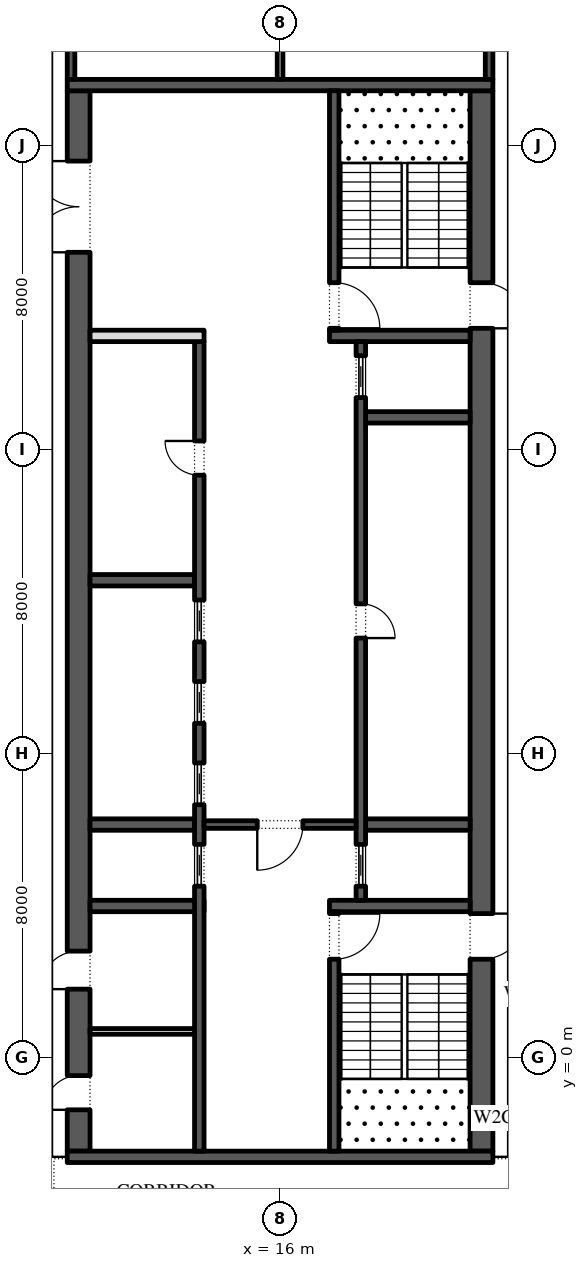
"""IFC4 building model, lengths in metres.
Left out: names, types, materials, properties, quantities, classifications, styles, units other than length and angle.
Written with IfcOpenShell. Run it as: python <this file> out.ifc"""

import sys

from ifc_helpers import new_model, si_unit, direction, frame, frame_2d, origin, place, context, subcontext, project, spatial, rectangle, extrude, element, fill, save


model = new_model("IFC4")
c1 = context("Model", 3, precision=1e-05, world=origin(), true_north=direction((0.0, 1.0)))
c2 = subcontext(c1, "Body", "Model", "MODEL_VIEW")
j1 = project(units=[si_unit("LENGTHUNIT", "METRE"), si_unit("PLANEANGLEUNIT", "RADIAN")], contexts=[c1])
p1 = place(None, origin())
s1 = spatial("IfcSite", under=j1, at=p1, CompositionType="ELEMENT")
p2 = place(p1, origin())
s2 = spatial("IfcBuilding", under=s1, at=p2, CompositionType="ELEMENT")
p3 = place(p2, frame((0.0, 0.0, 293.4)))
s3 = spatial("IfcBuildingStorey", under=s2, at=p3, CompositionType="ELEMENT", Elevation=293.4)
p4 = place(p3, frame((21.359, -11.678, 0.0), z_axis=(0.0, 0.0, 1.0), x_axis=(0.224949198343, 0.974370493275, 0.0)))
e1 = element("IfcWall", 1, at=p4, inside=s3, PredefinedType="STANDARD", context=c2, shape_type="SweptSolid", body=[
    extrude(rectangle(XDim=49.5, YDim=0.3, at=frame_2d((24.75, 0.0))), origin(), (0.0, 0.0, 1.0), 3.75),
])
p5 = place(p4, frame((0.907, 0.0, 0.45)))
e2 = element("IfcOpeningElement", 2, at=p5, cuts=e1, PredefinedType="OPENING", context=c2, shape_type="SweptSolid", body=[
    extrude(rectangle(XDim=5.0, YDim=3.25, at=frame_2d((2.5, 1.625))), frame((0.0, 0.16, 0.0), z_axis=(0.0, -1.0, 0.0), x_axis=(1.0, 0.0, 0.0)), (0.0, 0.0, 1.0), 0.32),
])
p6 = place(p4, frame((7.871, 0.0, 0.45)))
e3 = element("IfcOpeningElement", 3, at=p6, cuts=e1, PredefinedType="OPENING", context=c2, shape_type="SweptSolid", body=[
    extrude(rectangle(XDim=5.0, YDim=2.85, at=frame_2d((2.5, 1.425))), frame((0.0, 0.16, 0.0), z_axis=(0.0, -1.0, 0.0), x_axis=(1.0, 0.0, 0.0)), (0.0, 0.0, 1.0), 0.32),
])
p7 = place(p4, frame((14.986, 0.0, 0.45)))
e4 = element("IfcOpeningElement", 4, at=p7, cuts=e1, PredefinedType="OPENING", context=c2, shape_type="SweptSolid", body=[
    extrude(rectangle(XDim=5.0, YDim=2.85, at=frame_2d((2.5, 1.425))), frame((0.0, 0.16, 0.0), z_axis=(0.0, -1.0, 0.0), x_axis=(1.0, 0.0, 0.0)), (0.0, 0.0, 1.0), 0.32),
])
p8 = place(p4, frame((22.1, 0.0, 0.45)))
e5 = element("IfcOpeningElement", 5, at=p8, cuts=e1, PredefinedType="OPENING", context=c2, shape_type="SweptSolid", body=[
    extrude(rectangle(XDim=5.0, YDim=2.8, at=frame_2d((2.5, 1.4))), frame((0.0, 0.16, 0.0), z_axis=(0.0, -1.0, 0.0), x_axis=(1.0, 0.0, 0.0)), (0.0, 0.0, 1.0), 0.32),
])
p9 = place(p4, frame((29.214, 0.0, 0.45)))
e6 = element("IfcOpeningElement", 6, at=p9, cuts=e1, PredefinedType="OPENING", context=c2, shape_type="SweptSolid", body=[
    extrude(rectangle(XDim=5.0, YDim=2.7, at=frame_2d((2.5, 1.35))), frame((0.0, 0.16, 0.0), z_axis=(0.0, -1.0, 0.0), x_axis=(1.0, 0.0, 0.0)), (0.0, 0.0, 1.0), 0.32),
])
p10 = place(p4, frame((37.628, 0.0, 0.0)))
e7 = element("IfcOpeningElement", 7, at=p10, cuts=e1, PredefinedType="OPENING", context=c2, shape_type="SweptSolid", body=[
    extrude(rectangle(XDim=2.4, YDim=2.65, at=frame_2d((1.2, 1.325))), frame((0.0, 0.16, 0.0), z_axis=(0.0, -1.0, 0.0), x_axis=(1.0, 0.0, 0.0)), (0.0, 0.0, 1.0), 0.32),
])
p11 = place(p4, frame((43.443, 0.0, 0.45)))
e8 = element("IfcOpeningElement", 8, at=p11, cuts=e1, PredefinedType="OPENING", context=c2, shape_type="SweptSolid", body=[
    extrude(rectangle(XDim=5.0, YDim=3.25, at=frame_2d((2.5, 1.625))), frame((0.0, 0.16, 0.0), z_axis=(0.0, -1.0, 0.0), x_axis=(1.0, 0.0, 0.0)), (0.0, 0.0, 1.0), 0.32),
])
p12 = place(p3, frame((21.3, -2.45, 0.0), z_axis=(0.0, 0.0, 1.0), x_axis=(0.0, 1.0, 0.0)))
e9 = element("IfcWall", 9, at=p12, inside=s3, PredefinedType="SHEAR", context=c2, shape_type="SweptSolid", body=[
    extrude(rectangle(XDim=27.9, YDim=0.6, at=frame_2d((13.95, 0.0))), origin(), (0.0, 0.0, 1.0), 3.75),
])
p13 = place(p12, frame((5.05, 0.0, 0.0)))
e10 = element("IfcOpeningElement", 10, at=p13, cuts=e9, PredefinedType="OPENING", context=c2, shape_type="SweptSolid", body=[
    extrude(rectangle(XDim=1.2, YDim=2.1, at=frame_2d((0.6, 1.05))), frame((0.0, 0.31, 0.0), z_axis=(0.0, -1.0, 0.0), x_axis=(1.0, 0.0, 0.0)), (0.0, 0.0, 1.0), 0.62),
])
p14 = place(p12, frame((21.65, 0.0, 0.0)))
e11 = element("IfcOpeningElement", 11, at=p14, cuts=e9, PredefinedType="OPENING", context=c2, shape_type="SweptSolid", body=[
    extrude(rectangle(XDim=1.2, YDim=2.1, at=frame_2d((0.6, 1.05))), frame((0.0, 0.31, 0.0), z_axis=(0.0, -1.0, 0.0), x_axis=(1.0, 0.0, 0.0)), (0.0, 0.0, 1.0), 0.62),
])
p15 = place(p3, frame((10.7, -2.45, 0.0), z_axis=(0.0, 0.0, 1.0), x_axis=(0.0, 1.0, 0.0)))
e12 = element("IfcWall", 12, at=p15, inside=s3, PredefinedType="SHEAR", context=c2, shape_type="SweptSolid", body=[
    extrude(rectangle(XDim=27.9, YDim=0.6, at=frame_2d((13.95, 0.0))), origin(), (0.0, 0.0, 1.0), 3.75),
])
p16 = place(p15, frame((23.65, 0.0, 0.0)))
e13 = element("IfcOpeningElement", 13, at=p16, cuts=e12, PredefinedType="OPENING", context=c2, shape_type="SweptSolid", body=[
    extrude(rectangle(XDim=2.4, YDim=2.1, at=frame_2d((1.2, 1.05))), frame((0.0, 0.31, 0.0), z_axis=(0.0, -1.0, 0.0), x_axis=(1.0, 0.0, 0.0)), (0.0, 0.0, 1.0), 0.62),
])
p17 = place(p15, frame((1.087, 0.0, 0.0)))
e14 = element("IfcOpeningElement", 14, at=p17, cuts=e12, PredefinedType="OPENING", context=c2, shape_type="SweptSolid", body=[
    extrude(rectangle(XDim=0.9, YDim=2.1, at=frame_2d((0.45, 1.05))), frame((0.0, 0.31, 0.0), z_axis=(0.0, -1.0, 0.0), x_axis=(1.0, 0.0, 0.0)), (0.0, 0.0, 1.0), 0.62),
])
p18 = place(p15, frame((4.262, 0.0, 0.0)))
e15 = element("IfcOpeningElement", 15, at=p18, cuts=e12, PredefinedType="OPENING", context=c2, shape_type="SweptSolid", body=[
    extrude(rectangle(XDim=1.0, YDim=2.1, at=frame_2d((0.5, 1.05))), frame((0.0, 0.31, 0.0), z_axis=(0.0, -1.0, 0.0), x_axis=(1.0, 0.0, 0.0)), (0.0, 0.0, 1.0), 0.62),
])
for number, where, z_axis, x_axis in (
    (16, (10.4, -2.6, 0.0), (0.0, 0.0, 1.0), (1.0, 0.0, 0.0)),
    (17, (10.4, 25.6, 0.0), (0.0, 0.0, 1.0), (1.0, 0.0, 0.0)),
):
    element("IfcWall", number, at=place(p3, frame(where, z_axis=z_axis, x_axis=x_axis)), inside=s3, PredefinedType="SHEAR", context=c2, shape_type="SweptSolid", body=[
        extrude(rectangle(XDim=11.2, YDim=0.3, at=frame_2d((5.6, 0.0))), origin(), (0.0, 0.0, 1.0), 3.75),
    ])
p19 = place(p3, frame((17.3, 4.0, 0.0), z_axis=(0.0, 0.0, 1.0), x_axis=(1.0, 0.0, 0.0)))
e18 = element("IfcWall", 18, at=p19, inside=s3, PredefinedType="SHEAR", context=c2, shape_type="SweptSolid", body=[
    extrude(rectangle(XDim=3.7, YDim=0.3, at=frame_2d((1.85, 0.0))), origin(), (0.0, 0.0, 1.0), 3.75),
])
p20 = place(p3, frame((17.425, -2.45, 0.0), z_axis=(0.0, 0.0, 1.0), x_axis=(0.0, 1.0, 0.0)))
e19 = element("IfcWall", 19, at=p20, inside=s3, PredefinedType="SHEAR", context=c2, shape_type="SweptSolid", body=[
    extrude(rectangle(XDim=6.3, YDim=0.25, at=frame_2d((3.15, 0.0))), origin(), (0.0, 0.0, 1.0), 3.75),
])
p21 = place(p20, frame((5.05, 0.0, 0.0)))
e20 = element("IfcOpeningElement", 20, at=p21, cuts=e19, PredefinedType="OPENING", context=c2, shape_type="SweptSolid", body=[
    extrude(rectangle(XDim=1.2, YDim=2.1, at=frame_2d((0.6, 1.05))), frame((0.0, 0.135, 0.0), z_axis=(0.0, -1.0, 0.0), x_axis=(1.0, 0.0, 0.0)), (0.0, 0.0, 1.0), 0.27),
])
p22 = place(p3, frame((17.3, 19.0, 0.0), z_axis=(0.0, 0.0, 1.0), x_axis=(1.0, 0.0, 0.0)))
e21 = element("IfcWall", 21, at=p22, inside=s3, PredefinedType="SHEAR", context=c2, shape_type="SweptSolid", body=[
    extrude(rectangle(XDim=3.7, YDim=0.3, at=frame_2d((1.85, 0.0))), origin(), (0.0, 0.0, 1.0), 3.75),
])
p23 = place(p3, frame((17.425, 19.15, 0.0), z_axis=(0.0, 0.0, 1.0), x_axis=(0.0, 1.0, 0.0)))
e22 = element("IfcWall", 22, at=p23, inside=s3, PredefinedType="SHEAR", context=c2, shape_type="SweptSolid", body=[
    extrude(rectangle(XDim=6.3, YDim=0.25, at=frame_2d((3.15, 0.0))), origin(), (0.0, 0.0, 1.0), 3.75),
])
p24 = place(p23, frame((0.05, 0.0, 0.0)))
e23 = element("IfcOpeningElement", 23, at=p24, cuts=e22, PredefinedType="OPENING", context=c2, shape_type="SweptSolid", body=[
    extrude(rectangle(XDim=1.2, YDim=2.1, at=frame_2d((0.6, 1.05))), frame((0.0, 0.135, 0.0), z_axis=(0.0, -1.0, 0.0), x_axis=(1.0, 0.0, 0.0)), (0.0, 0.0, 1.0), 0.27),
])
for number, where, z_axis, x_axis in (
    (24, (18.25, 6.143, 0.0), (0.0, 0.0, 1.0), (1.0, 0.0, 0.0)),
    (25, (18.25, 16.857, 0.0), (0.0, 0.0, 1.0), (1.0, 0.0, 0.0)),
):
    element("IfcWall", number, at=place(p3, frame(where, z_axis=z_axis, x_axis=x_axis)), inside=s3, PredefinedType="SHEAR", context=c2, shape_type="SweptSolid", body=[
        extrude(rectangle(XDim=2.75, YDim=0.3, at=frame_2d((1.375, 0.0))), origin(), (0.0, 0.0, 1.0), 3.75),
    ])
p25 = place(p3, frame((18.125, 4.15, 0.0), z_axis=(0.0, 0.0, 1.0), x_axis=(0.0, 1.0, 0.0)))
e26 = element("IfcWall", 26, at=p25, inside=s3, PredefinedType="SHEAR", context=c2, shape_type="SweptSolid", body=[
    extrude(rectangle(XDim=14.7, YDim=0.25, at=frame_2d((7.35, 0.0))), origin(), (0.0, 0.0, 1.0), 3.75),
])
p26 = place(p25, frame((6.9, 0.0, 0.0)))
e27 = element("IfcOpeningElement", 27, at=p26, cuts=e26, PredefinedType="OPENING", context=c2, shape_type="SweptSolid", body=[
    extrude(rectangle(XDim=0.9, YDim=2.1, at=frame_2d((0.45, 1.05))), frame((0.0, 0.135, 0.0), z_axis=(0.0, -1.0, 0.0), x_axis=(1.0, 0.0, 0.0)), (0.0, 0.0, 1.0), 0.27),
])
p27 = place(p25, frame((0.371, 0.0, 0.0)))
e28 = element("IfcOpeningElement", 28, at=p27, cuts=e26, PredefinedType="OPENING", context=c2, shape_type="SweptSolid", body=[
    extrude(rectangle(XDim=1.1, YDim=2.1, at=frame_2d((0.55, 1.05))), frame((0.0, 0.135, 0.0), z_axis=(0.0, -1.0, 0.0), x_axis=(1.0, 0.0, 0.0)), (0.0, 0.0, 1.0), 0.27),
])
p28 = place(p25, frame((13.229, 0.0, 0.0)))
e29 = element("IfcOpeningElement", 29, at=p28, cuts=e26, PredefinedType="OPENING", context=c2, shape_type="SweptSolid", body=[
    extrude(rectangle(XDim=1.1, YDim=2.1, at=frame_2d((0.55, 1.05))), frame((0.0, 0.135, 0.0), z_axis=(0.0, -1.0, 0.0), x_axis=(1.0, 0.0, 0.0)), (0.0, 0.0, 1.0), 0.27),
])
p29 = place(p3, frame((11.0, 4.0, 0.0), z_axis=(0.0, 0.0, 1.0), x_axis=(1.0, 0.0, 0.0)))
e30 = element("IfcWall", 30, at=p29, inside=s3, PredefinedType="SHEAR", context=c2, shape_type="SweptSolid", body=[
    extrude(rectangle(XDim=3.0, YDim=0.3, at=frame_2d((1.5, 0.0))), origin(), (0.0, 0.0, 1.0), 3.75),
])
for number, where, z_axis, x_axis in (
    (31, (11.0, 6.143, 0.0), (0.0, 0.0, 1.0), (1.0, 0.0, 0.0)),
    (32, (11.0, 12.571, 0.0), (0.0, 0.0, 1.0), (1.0, 0.0, 0.0)),
):
    element("IfcWall", number, at=place(p3, frame(where, z_axis=z_axis, x_axis=x_axis)), inside=s3, PredefinedType="SHEAR", context=c2, shape_type="SweptSolid", body=[
        extrude(rectangle(XDim=2.75, YDim=0.3, at=frame_2d((1.375, 0.0))), origin(), (0.0, 0.0, 1.0), 3.75),
    ])
p30 = place(p3, frame((13.875, -2.45, 0.0), z_axis=(0.0, 0.0, 1.0), x_axis=(0.0, 1.0, 0.0)))
e33 = element("IfcWall", 33, at=p30, inside=s3, PredefinedType="SHEAR", context=c2, shape_type="SweptSolid", body=[
    extrude(rectangle(XDim=21.3, YDim=0.25, at=frame_2d((10.65, 0.0))), origin(), (0.0, 0.0, 1.0), 3.75),
])
p31 = place(p30, frame((17.786, 0.0, 0.0)))
e34 = element("IfcOpeningElement", 34, at=p31, cuts=e33, PredefinedType="OPENING", context=c2, shape_type="SweptSolid", body=[
    extrude(rectangle(XDim=0.9, YDim=2.1, at=frame_2d((0.45, 1.05))), frame((0.0, 0.135, 0.0), z_axis=(0.0, -1.0, 0.0), x_axis=(1.0, 0.0, 0.0)), (0.0, 0.0, 1.0), 0.27),
])
p32 = place(p30, frame((6.971, 0.0, 0.0)))
e35 = element("IfcOpeningElement", 35, at=p32, cuts=e33, PredefinedType="OPENING", context=c2, shape_type="SweptSolid", body=[
    extrude(rectangle(XDim=1.1, YDim=2.1, at=frame_2d((0.55, 1.05))), frame((0.0, 0.135, 0.0), z_axis=(0.0, -1.0, 0.0), x_axis=(1.0, 0.0, 0.0)), (0.0, 0.0, 1.0), 0.27),
])
p33 = place(p30, frame((9.114, 0.0, 0.0)))
e36 = element("IfcOpeningElement", 36, at=p33, cuts=e33, PredefinedType="OPENING", context=c2, shape_type="SweptSolid", body=[
    extrude(rectangle(XDim=1.1, YDim=2.1, at=frame_2d((0.55, 1.05))), frame((0.0, 0.135, 0.0), z_axis=(0.0, -1.0, 0.0), x_axis=(1.0, 0.0, 0.0)), (0.0, 0.0, 1.0), 0.27),
])
p34 = place(p30, frame((11.257, 0.0, 0.0)))
e37 = element("IfcOpeningElement", 37, at=p34, cuts=e33, PredefinedType="OPENING", context=c2, shape_type="SweptSolid", body=[
    extrude(rectangle(XDim=1.1, YDim=2.1, at=frame_2d((0.55, 1.05))), frame((0.0, 0.135, 0.0), z_axis=(0.0, -1.0, 0.0), x_axis=(1.0, 0.0, 0.0)), (0.0, 0.0, 1.0), 0.27),
])
p35 = place(p30, frame((13.4, 0.0, 0.0)))
e38 = element("IfcOpeningElement", 38, at=p35, cuts=e33, PredefinedType="OPENING", context=c2, shape_type="SweptSolid", body=[
    extrude(rectangle(XDim=1.1, YDim=2.1, at=frame_2d((0.55, 1.05))), frame((0.0, 0.135, 0.0), z_axis=(0.0, -1.0, 0.0), x_axis=(1.0, 0.0, 0.0)), (0.0, 0.0, 1.0), 0.27),
])
p36 = place(p3, frame((11.0, 19.0, 0.0), z_axis=(0.0, 0.0, 1.0), x_axis=(1.0, 0.0, 0.0)))
e39 = element("IfcWall", 39, at=p36, inside=s3, PredefinedType="PARTITIONING", context=c2, shape_type="SweptSolid", body=[
    extrude(rectangle(XDim=3.0, YDim=0.3, at=frame_2d((1.5, 0.0))), origin(), (0.0, 0.0, 1.0), 3.75),
])
p37 = place(p3, frame((14.0, 6.143, 0.0), z_axis=(0.0, 0.0, 1.0), x_axis=(1.0, 0.0, 0.0)))
e40 = element("IfcWall", 40, at=p37, inside=s3, PredefinedType="SHEAR", context=c2, shape_type="SweptSolid", body=[
    extrude(rectangle(XDim=4.0, YDim=0.2, at=frame_2d((2.0, 0.0))), origin(), (0.0, 0.0, 1.0), 3.75),
])
p38 = place(p37, frame((1.4, 0.0, 0.0)))
e41 = element("IfcOpeningElement", 41, at=p38, cuts=e40, PredefinedType="OPENING", context=c2, shape_type="SweptSolid", body=[
    extrude(rectangle(XDim=1.2, YDim=2.1, at=frame_2d((0.6, 1.05))), frame((0.0, 0.11, 0.0), z_axis=(0.0, -1.0, 0.0), x_axis=(1.0, 0.0, 0.0)), (0.0, 0.0, 1.0), 0.22),
])
p39 = place(p3, frame((11.0, 0.7, 0.0), z_axis=(0.0, 0.0, 1.0), x_axis=(1.0, 0.0, 0.0)))
e42 = element("IfcWall", 42, at=p39, inside=s3, PredefinedType="PARTITIONING", context=c2, shape_type="SweptSolid", body=[
    extrude(rectangle(XDim=2.75, YDim=0.15, at=frame_2d((1.375, 0.0))), origin(), (0.0, 0.0, 1.0), 3.75),
])
p40 = place(p3, frame((21.5, 25.75, 0.0), z_axis=(0.0, 0.0, 1.0), x_axis=(0.0, 1.0, 0.0)))
e43 = element("IfcWall", 43, at=p40, inside=s3, PredefinedType="SHEAR", context=c2, shape_type="SweptSolid", body=[
    extrude(rectangle(XDim=4.75, YDim=0.2, at=frame_2d((2.375, 0.0))), origin(), (0.0, 0.0, 1.0), 3.75),
])
p41 = place(p40, frame((1.925, 0.0, 0.0)))
e44 = element("IfcOpeningElement", 44, at=p41, cuts=e43, PredefinedType="OPENING", context=c2, shape_type="SweptSolid", body=[
    extrude(rectangle(XDim=0.9, YDim=2.1, at=frame_2d((0.45, 1.05))), frame((0.0, 0.11, 0.0), z_axis=(0.0, -1.0, 0.0), x_axis=(1.0, 0.0, 0.0)), (0.0, 0.0, 1.0), 0.22),
])
p42 = place(p3, frame((10.5, 25.75, 0.0), z_axis=(0.0, 0.0, 1.0), x_axis=(0.0, 1.0, 0.0)))
e45 = element("IfcWall", 45, at=p42, inside=s3, PredefinedType="SHEAR", context=c2, shape_type="SweptSolid", body=[
    extrude(rectangle(XDim=4.75, YDim=0.2, at=frame_2d((2.375, 0.0))), origin(), (0.0, 0.0, 1.0), 3.75),
])
p43 = place(p42, frame((1.925, 0.0, 0.0)))
e46 = element("IfcOpeningElement", 46, at=p43, cuts=e45, PredefinedType="OPENING", context=c2, shape_type="SweptSolid", body=[
    extrude(rectangle(XDim=0.9, YDim=2.1, at=frame_2d((0.45, 1.05))), frame((0.0, 0.11, 0.0), z_axis=(0.0, -1.0, 0.0), x_axis=(1.0, 0.0, 0.0)), (0.0, 0.0, 1.0), 0.22),
])
p44 = place(p3, frame((16.0, 25.75, 0.0), z_axis=(0.0, 0.0, 1.0), x_axis=(0.0, 1.0, 0.0)))
e47 = element("IfcWall", 47, at=p44, inside=s3, PredefinedType="PARTITIONING", context=c2, shape_type="SweptSolid", body=[
    extrude(rectangle(XDim=4.75, YDim=0.15, at=frame_2d((2.375, 0.0))), origin(), (0.0, 0.0, 1.0), 3.75),
])
p45 = place(p26, frame((0.9, -0.2, 0.0), z_axis=(0.0, 0.0, 1.0), x_axis=(-1.0, 0.0, 0.0)))
e48 = element("IfcDoor", 48, at=p45, inside=s3, OperationType="SINGLE_SWING_LEFT", PredefinedType="DOOR", context=c2, shape_type="SweptSolid", body=[
    extrude(rectangle(XDim=0.9, YDim=2.1, at=frame_2d((0.45, 1.05))), frame((0.0, -0.075, 0.0), z_axis=(0.0, -1.0, 0.0), x_axis=(1.0, 0.0, 0.0)), (0.0, 0.0, 1.0), 0.05),
])
fill(e27, e48)
p46 = place(p27, origin())
e49 = element("IfcDoor", 49, at=p46, inside=s3, OperationType="SLIDING_TO_LEFT", PredefinedType="DOOR", context=c2, shape_type="SweptSolid", body=[
    extrude(rectangle(XDim=1.1, YDim=2.1, at=frame_2d((0.55, 1.05))), frame((0.0, 0.025, 0.0), z_axis=(0.0, -1.0, 0.0), x_axis=(1.0, 0.0, 0.0)), (0.0, 0.0, 1.0), 0.05),
])
fill(e28, e49)
p47 = place(p28, origin())
e50 = element("IfcDoor", 50, at=p47, inside=s3, OperationType="SLIDING_TO_LEFT", PredefinedType="DOOR", context=c2, shape_type="SweptSolid", body=[
    extrude(rectangle(XDim=1.1, YDim=2.1, at=frame_2d((0.55, 1.05))), frame((0.0, 0.025, 0.0), z_axis=(0.0, -1.0, 0.0), x_axis=(1.0, 0.0, 0.0)), (0.0, 0.0, 1.0), 0.05),
])
fill(e29, e50)
p48 = place(p31, origin())
e51 = element("IfcDoor", 51, at=p48, inside=s3, OperationType="SINGLE_SWING_LEFT", PredefinedType="DOOR", context=c2, shape_type="SweptSolid", body=[
    extrude(rectangle(XDim=0.9, YDim=2.1, at=frame_2d((0.45, 1.05))), frame((0.0, 0.125, 0.0), z_axis=(0.0, -1.0, 0.0), x_axis=(1.0, 0.0, 0.0)), (0.0, 0.0, 1.0), 0.05),
])
fill(e34, e51)
p49 = place(p32, origin())
e52 = element("IfcDoor", 52, at=p49, inside=s3, OperationType="SLIDING_TO_LEFT", PredefinedType="DOOR", context=c2, shape_type="SweptSolid", body=[
    extrude(rectangle(XDim=1.1, YDim=2.1, at=frame_2d((0.55, 1.05))), frame((0.0, 0.025, 0.0), z_axis=(0.0, -1.0, 0.0), x_axis=(1.0, 0.0, 0.0)), (0.0, 0.0, 1.0), 0.05),
])
fill(e35, e52)
p50 = place(p33, origin())
e53 = element("IfcDoor", 53, at=p50, inside=s3, OperationType="SLIDING_TO_LEFT", PredefinedType="DOOR", context=c2, shape_type="SweptSolid", body=[
    extrude(rectangle(XDim=1.1, YDim=2.1, at=frame_2d((0.55, 1.05))), frame((0.0, 0.025, 0.0), z_axis=(0.0, -1.0, 0.0), x_axis=(1.0, 0.0, 0.0)), (0.0, 0.0, 1.0), 0.05),
])
fill(e36, e53)
p51 = place(p34, origin())
e54 = element("IfcDoor", 54, at=p51, inside=s3, OperationType="SLIDING_TO_LEFT", PredefinedType="DOOR", context=c2, shape_type="SweptSolid", body=[
    extrude(rectangle(XDim=1.1, YDim=2.1, at=frame_2d((0.55, 1.05))), frame((0.0, 0.025, 0.0), z_axis=(0.0, -1.0, 0.0), x_axis=(1.0, 0.0, 0.0)), (0.0, 0.0, 1.0), 0.05),
])
fill(e37, e54)
p52 = place(p35, origin())
e55 = element("IfcDoor", 55, at=p52, inside=s3, OperationType="SLIDING_TO_LEFT", PredefinedType="DOOR", context=c2, shape_type="SweptSolid", body=[
    extrude(rectangle(XDim=1.1, YDim=2.1, at=frame_2d((0.55, 1.05))), frame((0.0, 0.025, 0.0), z_axis=(0.0, -1.0, 0.0), x_axis=(1.0, 0.0, 0.0)), (0.0, 0.0, 1.0), 0.05),
])
fill(e38, e55)
p53 = place(p38, frame((1.2, 0.0, 0.0), z_axis=(0.0, 0.0, 1.0), x_axis=(-1.0, 0.0, 0.0)))
e56 = element("IfcDoor", 56, at=p53, inside=s3, OperationType="SINGLE_SWING_LEFT", PredefinedType="DOOR", context=c2, shape_type="SweptSolid", body=[
    extrude(rectangle(XDim=1.2, YDim=2.1, at=frame_2d((0.6, 1.05))), frame((0.0, 0.025, 0.0), z_axis=(0.0, -1.0, 0.0), x_axis=(1.0, 0.0, 0.0)), (0.0, 0.0, 1.0), 0.05),
])
fill(e41, e56)
p54 = place(p16, origin())
e57 = element("IfcDoor", 57, at=p54, inside=s3, OperationType="DOUBLE_DOOR_SINGLE_SWING", PredefinedType="DOOR", context=c2, shape_type="SweptSolid", body=[
    extrude(rectangle(XDim=2.4, YDim=2.1, at=frame_2d((1.2, 1.05))), frame((0.0, 0.025, 0.0), z_axis=(0.0, -1.0, 0.0), x_axis=(1.0, 0.0, 0.0)), (0.0, 0.0, 1.0), 0.05),
])
fill(e13, e57)
p55 = place(p21, frame((1.2, 0.0, 0.0), z_axis=(0.0, 0.0, 1.0), x_axis=(-1.0, 0.0, 0.0)))
e58 = element("IfcDoor", 58, at=p55, inside=s3, OperationType="SINGLE_SWING_RIGHT", PredefinedType="DOOR", context=c2, shape_type="SweptSolid", body=[
    extrude(rectangle(XDim=1.2, YDim=2.1, at=frame_2d((0.6, 1.05))), frame((0.0, 0.025, 0.0), z_axis=(0.0, -1.0, 0.0), x_axis=(1.0, 0.0, 0.0)), (0.0, 0.0, 1.0), 0.05),
])
fill(e20, e58)
p56 = place(p13, frame((1.2, 0.0, 0.0), z_axis=(0.0, 0.0, 1.0), x_axis=(-1.0, 0.0, 0.0)))
e59 = element("IfcDoor", 59, at=p56, inside=s3, OperationType="SINGLE_SWING_RIGHT", PredefinedType="DOOR", context=c2, shape_type="SweptSolid", body=[
    extrude(rectangle(XDim=1.2, YDim=2.1, at=frame_2d((0.6, 1.05))), frame((0.0, 0.025, 0.0), z_axis=(0.0, -1.0, 0.0), x_axis=(1.0, 0.0, 0.0)), (0.0, 0.0, 1.0), 0.05),
])
fill(e10, e59)
p57 = place(p24, frame((1.2, 0.0, 0.0), z_axis=(0.0, 0.0, 1.0), x_axis=(-1.0, 0.0, 0.0)))
e60 = element("IfcDoor", 60, at=p57, inside=s3, OperationType="SINGLE_SWING_LEFT", PredefinedType="DOOR", context=c2, shape_type="SweptSolid", body=[
    extrude(rectangle(XDim=1.2, YDim=2.1, at=frame_2d((0.6, 1.05))), frame((0.0, 0.025, 0.0), z_axis=(0.0, -1.0, 0.0), x_axis=(1.0, 0.0, 0.0)), (0.0, 0.0, 1.0), 0.05),
])
fill(e23, e60)
p58 = place(p14, frame((1.2, 0.0, 0.0), z_axis=(0.0, 0.0, 1.0), x_axis=(-1.0, 0.0, 0.0)))
e61 = element("IfcDoor", 61, at=p58, inside=s3, OperationType="SINGLE_SWING_LEFT", PredefinedType="DOOR", context=c2, shape_type="SweptSolid", body=[
    extrude(rectangle(XDim=1.2, YDim=2.1, at=frame_2d((0.6, 1.05))), frame((0.0, 0.025, 0.0), z_axis=(0.0, -1.0, 0.0), x_axis=(1.0, 0.0, 0.0)), (0.0, 0.0, 1.0), 0.05),
])
fill(e11, e61)
p59 = place(p17, origin())
e62 = element("IfcDoor", 62, at=p59, inside=s3, OperationType="SINGLE_SWING_RIGHT", PredefinedType="DOOR", context=c2, shape_type="SweptSolid", body=[
    extrude(rectangle(XDim=0.9, YDim=2.1, at=frame_2d((0.45, 1.05))), frame((0.0, -0.25, 0.0), z_axis=(0.0, -1.0, 0.0), x_axis=(1.0, 0.0, 0.0)), (0.0, 0.0, 1.0), 0.05),
])
fill(e14, e62)
p60 = place(p18, origin())
e63 = element("IfcDoor", 63, at=p60, inside=s3, OperationType="SINGLE_SWING_RIGHT", PredefinedType="DOOR", context=c2, shape_type="SweptSolid", body=[
    extrude(rectangle(XDim=1.0, YDim=2.1, at=frame_2d((0.5, 1.05))), frame((0.0, -0.25, 0.0), z_axis=(0.0, -1.0, 0.0), x_axis=(1.0, 0.0, 0.0)), (0.0, 0.0, 1.0), 0.05),
])
fill(e15, e63)
save(model, sys.argv[1])
